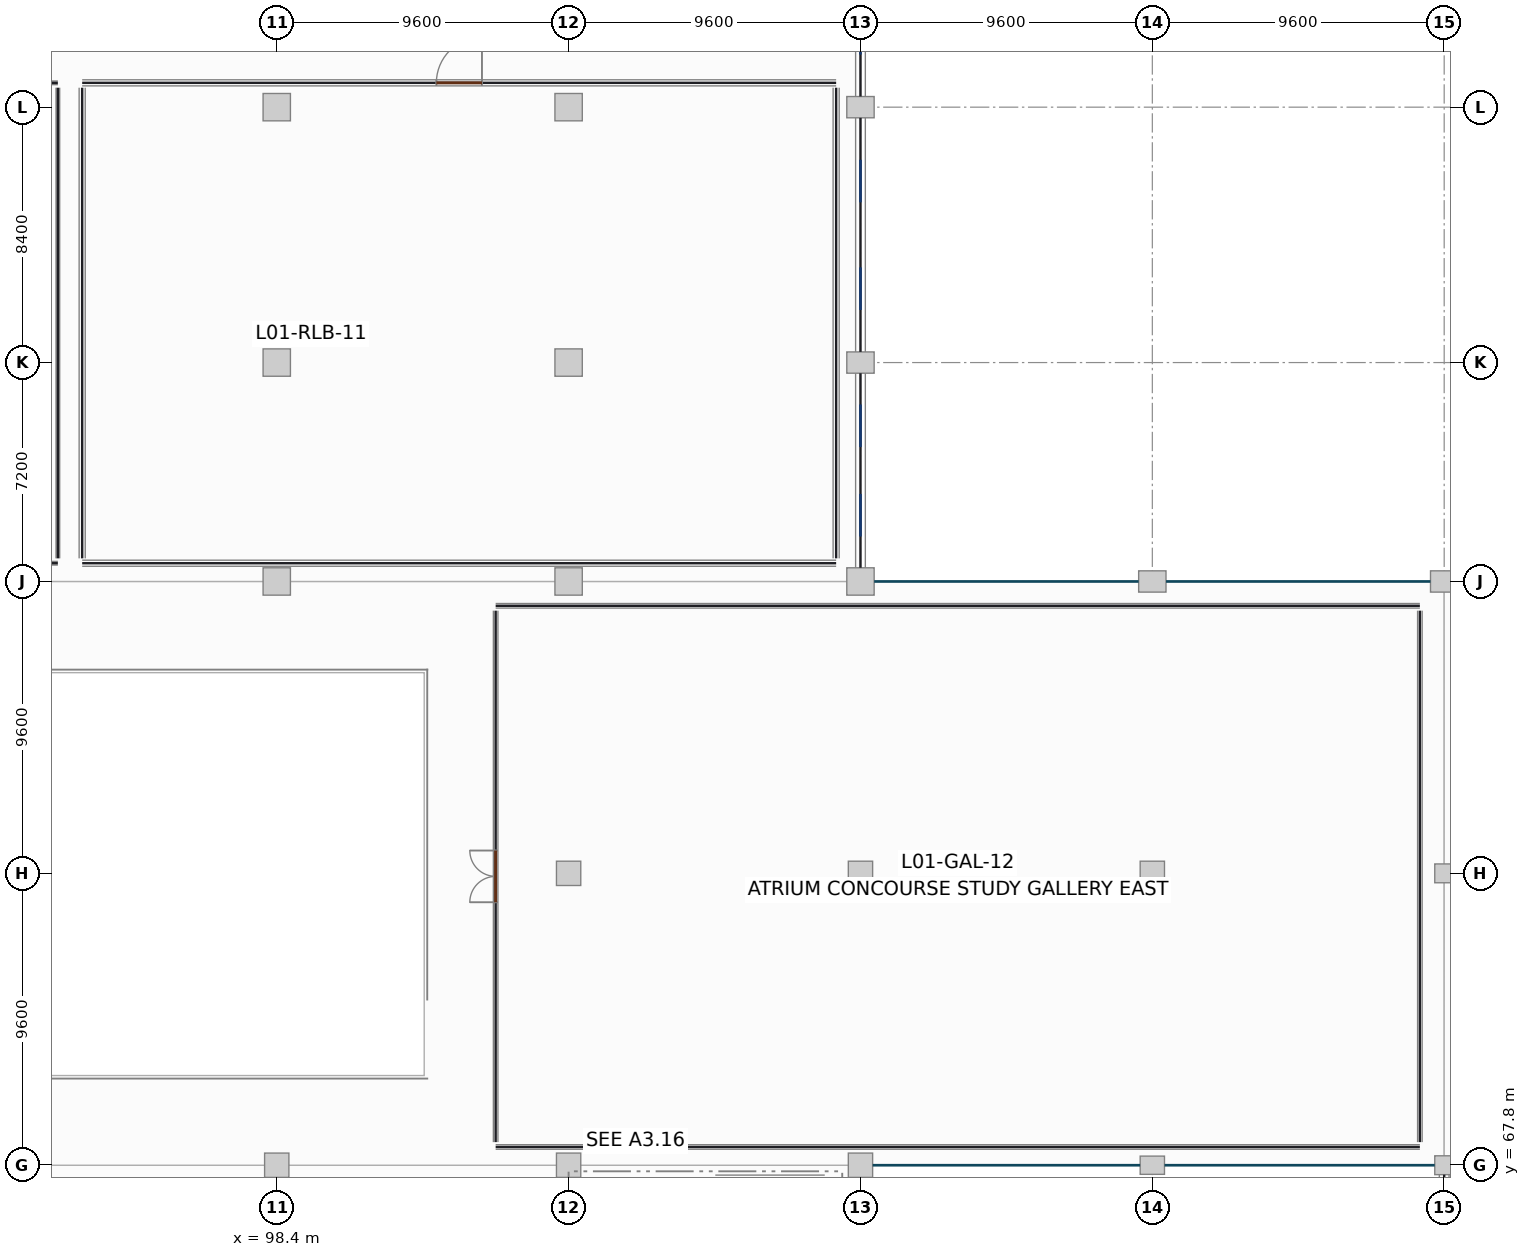
"""IFC4 building model, lengths in metres.
Left out: names, types, materials, properties, quantities, classifications, styles, units other than length and angle.
Written with IfcOpenShell. Run it as: python <this file> out.ifc"""

import sys

from ifc_helpers import new_model, si_unit, direction, frame, frame_2d, origin, origin_2d, place, context, subcontext, project, spatial, rectangle, extrude, element, fill, save


model = new_model("IFC4")
c1 = context("Model", 3, precision=1e-05, world=origin(), true_north=direction((0.0, 1.0)))
c2 = subcontext(c1, "Body", "Model", "MODEL_VIEW")
j1 = project(units=[si_unit("LENGTHUNIT", "METRE"), si_unit("PLANEANGLEUNIT", "RADIAN")], contexts=[c1])
p1 = place(None, origin())
s1 = spatial("IfcSite", under=j1, at=p1, CompositionType="ELEMENT")
p2 = place(p1, origin())
s2 = spatial("IfcBuilding", under=s1, at=p2, CompositionType="ELEMENT")
p3 = place(p2, frame((0.0, 0.0, 5.4)))
s3 = spatial("IfcBuildingStorey", under=s2, at=p3, CompositionType="ELEMENT", Elevation=5.4)
p4 = place(p3, frame((98.4, 67.8, 0.0), z_axis=(0.0, 0.0, 1.0), x_axis=(1.0, 0.0, 0.0)))
e1 = element("IfcColumn", 1, at=p4, inside=s3, PredefinedType="COLUMN", context=c2, shape_type="SweptSolid", body=[
    extrude(rectangle(XDim=0.8, YDim=0.8, at=origin_2d()), origin(), (0.0, 0.0, 1.0), 4.18),
])
for number, where, z_axis, x_axis in (
    (2, (98.4, 87.0, 0.0), (0.0, 0.0, 1.0), (1.0, 0.0, 0.0)),
    (3, (98.4, 94.2, 0.0), (0.0, 0.0, 1.0), (1.0, 0.0, 0.0)),
    (4, (98.4, 102.6, 0.0), (0.0, 0.0, 1.0), (1.0, 0.0, 0.0)),
):
    element("IfcColumn", number, at=place(p3, frame(where, z_axis=z_axis, x_axis=x_axis)), inside=s3, PredefinedType="COLUMN", context=c2, shape_type="SweptSolid", body=[
        extrude(rectangle(XDim=0.9, YDim=0.9, at=origin_2d()), origin(), (0.0, 0.0, 1.0), 4.18),
    ])
for number, where, z_axis, x_axis in (
    (5, (108.0, 67.8, 0.0), (0.0, 0.0, 1.0), (1.0, 0.0, 0.0)),
    (6, (108.0, 77.4, 0.0), (0.0, 0.0, 1.0), (1.0, 0.0, 0.0)),
):
    element("IfcColumn", number, at=place(p3, frame(where, z_axis=z_axis, x_axis=x_axis)), inside=s3, PredefinedType="COLUMN", context=c2, shape_type="SweptSolid", body=[
        extrude(rectangle(XDim=0.8, YDim=0.8, at=origin_2d()), origin(), (0.0, 0.0, 1.0), 4.18),
    ])
for number, where, z_axis, x_axis in (
    (7, (108.0, 87.0, 0.0), (0.0, 0.0, 1.0), (1.0, 0.0, 0.0)),
    (8, (108.0, 94.2, 0.0), (0.0, 0.0, 1.0), (1.0, 0.0, 0.0)),
    (9, (108.0, 102.6, 0.0), (0.0, 0.0, 1.0), (1.0, 0.0, 0.0)),
):
    element("IfcColumn", number, at=place(p3, frame(where, z_axis=z_axis, x_axis=x_axis)), inside=s3, PredefinedType="COLUMN", context=c2, shape_type="SweptSolid", body=[
        extrude(rectangle(XDim=0.9, YDim=0.9, at=origin_2d()), origin(), (0.0, 0.0, 1.0), 4.18),
    ])
for number, where, z_axis, x_axis in (
    (10, (117.6, 67.8, 0.0), (0.0, 0.0, 1.0), (1.0, 0.0, 0.0)),
    (11, (117.6, 77.4, 0.0), (0.0, 0.0, 1.0), (1.0, 0.0, 0.0)),
):
    element("IfcColumn", number, at=place(p3, frame(where, z_axis=z_axis, x_axis=x_axis)), inside=s3, PredefinedType="COLUMN", context=c2, shape_type="SweptSolid", body=[
        extrude(rectangle(XDim=0.8, YDim=0.8, at=origin_2d()), origin(), (0.0, 0.0, 1.0), 4.18),
    ])
p5 = place(p3, frame((117.6, 87.0, 0.0), z_axis=(0.0, 0.0, 1.0), x_axis=(1.0, 0.0, 0.0)))
e12 = element("IfcColumn", 12, at=p5, inside=s3, PredefinedType="COLUMN", context=c2, shape_type="SweptSolid", body=[
    extrude(rectangle(XDim=0.9, YDim=0.9, at=origin_2d()), origin(), (0.0, 0.0, 1.0), 4.18),
])
for number, where, z_axis, x_axis in (
    (13, (117.6, 94.2, 0.0), (0.0, 0.0, 1.0), (1.0, 0.0, 0.0)),
    (14, (117.6, 102.6, 0.0), (0.0, 0.0, 1.0), (1.0, 0.0, 0.0)),
):
    element("IfcColumn", number, at=place(p3, frame(where, z_axis=z_axis, x_axis=x_axis)), inside=s3, PredefinedType="COLUMN", context=c2, shape_type="SweptSolid", body=[
        extrude(rectangle(XDim=0.9, YDim=0.7, at=origin_2d()), origin(), (0.0, 0.0, 1.0), 4.18),
    ])
p6 = place(p3, frame((127.2, 67.8, 0.0), z_axis=(0.0, 0.0, 1.0), x_axis=(1.0, 0.0, 0.0)))
e15 = element("IfcColumn", 15, at=p6, inside=s3, PredefinedType="COLUMN", context=c2, shape_type="SweptSolid", body=[
    extrude(rectangle(XDim=0.8, YDim=0.6, at=origin_2d()), origin(), (0.0, 0.0, 1.0), 4.18),
])
p7 = place(p3, frame((127.2, 77.4, 0.0), z_axis=(0.0, 0.0, 1.0), x_axis=(1.0, 0.0, 0.0)))
e16 = element("IfcColumn", 16, at=p7, inside=s3, PredefinedType="COLUMN", context=c2, shape_type="SweptSolid", body=[
    extrude(rectangle(XDim=0.8, YDim=0.8, at=origin_2d()), origin(), (0.0, 0.0, 1.0), 4.18),
])
p8 = place(p3, frame((127.2, 87.0, 0.0), z_axis=(0.0, 0.0, 1.0), x_axis=(1.0, 0.0, 0.0)))
e17 = element("IfcColumn", 17, at=p8, inside=s3, PredefinedType="COLUMN", context=c2, shape_type="SweptSolid", body=[
    extrude(rectangle(XDim=0.9, YDim=0.7, at=origin_2d()), origin(), (0.0, 0.0, 1.0), 4.18),
])
for number, where, z_axis, x_axis in (
    (18, (136.8, 67.8, 0.0), (0.0, 0.0, 1.0), (1.0, 0.0, 0.0)),
    (19, (136.8, 77.4, 0.0), (0.0, 0.0, 1.0), (1.0, 0.0, 0.0)),
):
    element("IfcColumn", number, at=place(p3, frame(where, z_axis=z_axis, x_axis=x_axis)), inside=s3, PredefinedType="COLUMN", context=c2, shape_type="SweptSolid", body=[
        extrude(rectangle(XDim=0.62, YDim=0.62, at=origin_2d()), origin(), (0.0, 0.0, 1.0), 4.18),
    ])
p9 = place(p3, frame((136.8, 87.0, 0.0), z_axis=(0.0, 0.0, 1.0), x_axis=(1.0, 0.0, 0.0)))
e20 = element("IfcColumn", 20, at=p9, inside=s3, PredefinedType="COLUMN", context=c2, shape_type="SweptSolid", body=[
    extrude(rectangle(XDim=0.9, YDim=0.7, at=origin_2d()), origin(), (0.0, 0.0, 1.0), 4.18),
])
p10 = place(p3, frame((117.6, 87.452, 0.0), z_axis=(0.0, 0.0, 1.0), x_axis=(0.0, 1.0, 0.0)))
e21 = element("IfcWall", 21, at=p10, inside=s3, PredefinedType="SOLIDWALL", context=c2, shape_type="SweptSolid", body=[
    extrude(rectangle(XDim=6.396, YDim=0.32, at=frame_2d((3.198, 0.0))), origin(), (0.0, 0.0, 1.0), 3.38),
])
p11 = place(p10, frame((1.027, 0.0, 0.85)))
e22 = element("IfcOpeningElement", 22, at=p11, cuts=e21, PredefinedType="OPENING", context=c2, shape_type="SweptSolid", body=[
    extrude(rectangle(XDim=1.4, YDim=1.65, at=frame_2d((0.7, 0.825))), frame((0.0, 0.17, 0.0), z_axis=(0.0, -1.0, 0.0), x_axis=(1.0, 0.0, 0.0)), (0.0, 0.0, 1.0), 0.34),
])
p12 = place(p10, frame((3.969, 0.0, 0.85)))
e23 = element("IfcOpeningElement", 23, at=p12, cuts=e21, PredefinedType="OPENING", context=c2, shape_type="SweptSolid", body=[
    extrude(rectangle(XDim=1.4, YDim=1.65, at=frame_2d((0.7, 0.825))), frame((0.0, 0.17, 0.0), z_axis=(0.0, -1.0, 0.0), x_axis=(1.0, 0.0, 0.0)), (0.0, 0.0, 1.0), 0.34),
])
p13 = place(p3, frame((117.6, 94.552, 0.0), z_axis=(0.0, 0.0, 1.0), x_axis=(0.0, 1.0, 0.0)))
e24 = element("IfcWall", 24, at=p13, inside=s3, PredefinedType="SOLIDWALL", context=c2, shape_type="SweptSolid", body=[
    extrude(rectangle(XDim=7.696, YDim=0.32, at=frame_2d((3.848, 0.0))), origin(), (0.0, 0.0, 1.0), 3.38),
])
p14 = place(p13, frame((1.378, 0.0, 0.85)))
e25 = element("IfcOpeningElement", 25, at=p14, cuts=e24, PredefinedType="OPENING", context=c2, shape_type="SweptSolid", body=[
    extrude(rectangle(XDim=1.4, YDim=1.65, at=frame_2d((0.7, 0.825))), frame((0.0, 0.17, 0.0), z_axis=(0.0, -1.0, 0.0), x_axis=(1.0, 0.0, 0.0)), (0.0, 0.0, 1.0), 0.34),
])
p15 = place(p13, frame((4.918, 0.0, 0.85)))
e26 = element("IfcOpeningElement", 26, at=p15, cuts=e24, PredefinedType="OPENING", context=c2, shape_type="SweptSolid", body=[
    extrude(rectangle(XDim=1.4, YDim=1.65, at=frame_2d((0.7, 0.825))), frame((0.0, 0.17, 0.0), z_axis=(0.0, -1.0, 0.0), x_axis=(1.0, 0.0, 0.0)), (0.0, 0.0, 1.0), 0.34),
])
p16 = place(p3, frame((117.6, 102.952, 0.0), z_axis=(0.0, 0.0, 1.0), x_axis=(0.0, 1.0, 0.0)))
e27 = element("IfcWall", 27, at=p16, inside=s3, PredefinedType="SOLIDWALL", context=c2, shape_type="SweptSolid", body=[
    extrude(rectangle(XDim=7.696, YDim=0.32, at=frame_2d((3.848, 0.0))), origin(), (0.0, 0.0, 1.0), 3.38),
])
p17 = place(p16, frame((1.378, 0.0, 0.85)))
e28 = element("IfcOpeningElement", 28, at=p17, cuts=e27, PredefinedType="OPENING", context=c2, shape_type="SweptSolid", body=[
    extrude(rectangle(XDim=1.4, YDim=1.65, at=frame_2d((0.7, 0.825))), frame((0.0, 0.17, 0.0), z_axis=(0.0, -1.0, 0.0), x_axis=(1.0, 0.0, 0.0)), (0.0, 0.0, 1.0), 0.34),
])
p18 = place(p16, frame((4.918, 0.0, 0.85)))
e29 = element("IfcOpeningElement", 29, at=p18, cuts=e27, PredefinedType="OPENING", context=c2, shape_type="SweptSolid", body=[
    extrude(rectangle(XDim=1.4, YDim=1.65, at=frame_2d((0.7, 0.825))), frame((0.0, 0.17, 0.0), z_axis=(0.0, -1.0, 0.0), x_axis=(1.0, 0.0, 0.0)), (0.0, 0.0, 1.0), 0.34),
])
p19 = place(p3, frame((136.8, 58.432, 0.0), z_axis=(0.0, 0.0, 1.0), x_axis=(0.0, 1.0, 0.0)))
e30 = element("IfcWall", 30, at=p19, inside=s3, PredefinedType="SOLIDWALL", context=c2, shape_type="SweptSolid", body=[
    extrude(rectangle(XDim=9.056, YDim=0.32, at=frame_2d((4.528, 0.0))), origin(), (0.0, 0.0, 1.0), 3.38),
])
p20 = place(p19, frame((1.745, 0.0, 0.85)))
e31 = element("IfcOpeningElement", 31, at=p20, cuts=e30, PredefinedType="OPENING", context=c2, shape_type="SweptSolid", body=[
    extrude(rectangle(XDim=1.4, YDim=1.65, at=frame_2d((0.7, 0.825))), frame((0.0, 0.17, 0.0), z_axis=(0.0, -1.0, 0.0), x_axis=(1.0, 0.0, 0.0)), (0.0, 0.0, 1.0), 0.34),
])
p21 = place(p19, frame((5.911, 0.0, 0.85)))
e32 = element("IfcOpeningElement", 32, at=p21, cuts=e30, PredefinedType="OPENING", context=c2, shape_type="SweptSolid", body=[
    extrude(rectangle(XDim=1.4, YDim=1.65, at=frame_2d((0.7, 0.825))), frame((0.0, 0.17, 0.0), z_axis=(0.0, -1.0, 0.0), x_axis=(1.0, 0.0, 0.0)), (0.0, 0.0, 1.0), 0.34),
])
p22 = place(p3, frame((112.825, 67.3, 0.0), z_axis=(0.0, 0.0, 1.0), x_axis=(1.0, 0.0, 0.0)))
e33 = element("IfcWall", 33, at=p22, inside=s3, PredefinedType="SHEAR", context=c2, shape_type="SweptSolid", body=[
    extrude(rectangle(XDim=3.6, YDim=0.35, at=frame_2d((1.8, 0.0))), origin(), (0.0, 0.0, 1.0), 4.18),
])
for number, where, z_axis, x_axis in (
    (34, (105.6, 68.4, 0.0), (0.0, 0.0, 1.0), (1.0, 0.0, 0.0)),
    (35, (105.6, 86.2, 0.0), (0.0, 0.0, 1.0), (1.0, 0.0, 0.0)),
):
    element("IfcWall", number, at=place(p3, frame(where, z_axis=z_axis, x_axis=x_axis)), inside=s3, PredefinedType="PARTITIONING", context=c2, shape_type="SweptSolid", body=[
        extrude(rectangle(XDim=30.4, YDim=0.15, at=frame_2d((15.2, 0.0))), origin(), (0.0, 0.0, 1.0), 3.22),
    ])
p23 = place(p3, frame((105.6, 68.56, 0.0), z_axis=(0.0, 0.0, 1.0), x_axis=(0.0, 1.0, 0.0)))
e36 = element("IfcWall", 36, at=p23, inside=s3, PredefinedType="PARTITIONING", context=c2, shape_type="SweptSolid", body=[
    extrude(rectangle(XDim=17.48, YDim=0.15, at=frame_2d((8.74, 0.0))), origin(), (0.0, 0.0, 1.0), 3.22),
])
p24 = place(p23, frame((7.89, 0.0, 0.0)))
e37 = element("IfcOpeningElement", 37, at=p24, cuts=e36, PredefinedType="OPENING", context=c2, shape_type="SweptSolid", body=[
    extrude(rectangle(XDim=1.7, YDim=2.3, at=frame_2d((0.85, 1.15))), frame((0.0, 0.085, 0.0), z_axis=(0.0, -1.0, 0.0), x_axis=(1.0, 0.0, 0.0)), (0.0, 0.0, 1.0), 0.17),
])
p25 = place(p3, frame((136.0, 68.56, 0.0), z_axis=(0.0, 0.0, 1.0), x_axis=(0.0, 1.0, 0.0)))
e38 = element("IfcWall", 38, at=p25, inside=s3, PredefinedType="PARTITIONING", context=c2, shape_type="SweptSolid", body=[
    extrude(rectangle(XDim=17.48, YDim=0.15, at=frame_2d((8.74, 0.0))), origin(), (0.0, 0.0, 1.0), 3.22),
])
p26 = place(p3, frame((66.6, 87.6, 0.0), z_axis=(0.0, 0.0, 1.0), x_axis=(1.0, 0.0, 0.0)))
e39 = element("IfcWall", 39, at=p26, inside=s3, PredefinedType="PARTITIONING", context=c2, shape_type="SweptSolid", body=[
    extrude(rectangle(XDim=24.6, YDim=0.12, at=frame_2d((12.3, 0.0))), origin(), (0.0, 0.0, 1.0), 3.22),
])
p27 = place(p3, frame((66.6, 103.4, 0.0), z_axis=(0.0, 0.0, 1.0), x_axis=(1.0, 0.0, 0.0)))
e40 = element("IfcWall", 40, at=p27, inside=s3, PredefinedType="PARTITIONING", context=c2, shape_type="SweptSolid", body=[
    extrude(rectangle(XDim=24.6, YDim=0.12, at=frame_2d((12.3, 0.0))), origin(), (0.0, 0.0, 1.0), 3.22),
])
p28 = place(p27, frame((8.135, 0.0, 0.0)))
e41 = element("IfcOpeningElement", 41, at=p28, cuts=e40, PredefinedType="OPENING", context=c2, shape_type="SweptSolid", body=[
    extrude(rectangle(XDim=0.95, YDim=2.15, at=frame_2d((0.475, 1.075))), frame((0.0, 0.07, 0.0), z_axis=(0.0, -1.0, 0.0), x_axis=(1.0, 0.0, 0.0)), (0.0, 0.0, 1.0), 0.14),
])
p29 = place(p3, frame((91.2, 87.76, 0.0), z_axis=(0.0, 0.0, 1.0), x_axis=(0.0, 1.0, 0.0)))
e42 = element("IfcWall", 42, at=p29, inside=s3, PredefinedType="PARTITIONING", context=c2, shape_type="SweptSolid", body=[
    extrude(rectangle(XDim=15.48, YDim=0.12, at=frame_2d((7.74, 0.0))), origin(), (0.0, 0.0, 1.0), 3.22),
])
p30 = place(p3, frame((92.0, 87.6, 0.0), z_axis=(0.0, 0.0, 1.0), x_axis=(1.0, 0.0, 0.0)))
e43 = element("IfcWall", 43, at=p30, inside=s3, PredefinedType="PARTITIONING", context=c2, shape_type="SweptSolid", body=[
    extrude(rectangle(XDim=24.8, YDim=0.2, at=frame_2d((12.4, 0.0))), origin(), (0.0, 0.0, 1.0), 3.22),
])
p31 = place(p3, frame((92.0, 103.4, 0.0), z_axis=(0.0, 0.0, 1.0), x_axis=(1.0, 0.0, 0.0)))
e44 = element("IfcWall", 44, at=p31, inside=s3, PredefinedType="PARTITIONING", context=c2, shape_type="SweptSolid", body=[
    extrude(rectangle(XDim=24.8, YDim=0.2, at=frame_2d((12.4, 0.0))), origin(), (0.0, 0.0, 1.0), 3.22),
])
p32 = place(p31, frame((11.65, 0.0, 0.0)))
e45 = element("IfcOpeningElement", 45, at=p32, cuts=e44, PredefinedType="OPENING", context=c2, shape_type="SweptSolid", body=[
    extrude(rectangle(XDim=1.5, YDim=2.2, at=frame_2d((0.75, 1.1))), frame((0.0, 0.11, 0.0), z_axis=(0.0, -1.0, 0.0), x_axis=(1.0, 0.0, 0.0)), (0.0, 0.0, 1.0), 0.22),
])
for number, where, z_axis, x_axis in (
    (46, (92.0, 87.76, 0.0), (0.0, 0.0, 1.0), (0.0, 1.0, 0.0)),
    (47, (116.8, 87.76, 0.0), (0.0, 0.0, 1.0), (0.0, 1.0, 0.0)),
):
    element("IfcWall", number, at=place(p3, frame(where, z_axis=z_axis, x_axis=x_axis)), inside=s3, PredefinedType="PARTITIONING", context=c2, shape_type="SweptSolid", body=[
        extrude(rectangle(XDim=15.48, YDim=0.2, at=frame_2d((7.74, 0.0))), origin(), (0.0, 0.0, 1.0), 3.22),
    ])
p33 = place(p11, origin())
e48 = element("IfcWindow", 48, at=p33, inside=s3, PartitioningType="SINGLE_PANEL", PredefinedType="WINDOW", context=c2, shape_type="SweptSolid", body=[
    extrude(rectangle(XDim=1.4, YDim=1.65, at=frame_2d((0.7, 0.825))), frame((0.0, 0.03, 0.0), z_axis=(0.0, -1.0, 0.0), x_axis=(1.0, 0.0, 0.0)), (0.0, 0.0, 1.0), 0.06),
])
fill(e22, e48)
p34 = place(p12, origin())
e49 = element("IfcWindow", 49, at=p34, inside=s3, PartitioningType="SINGLE_PANEL", PredefinedType="WINDOW", context=c2, shape_type="SweptSolid", body=[
    extrude(rectangle(XDim=1.4, YDim=1.65, at=frame_2d((0.7, 0.825))), frame((0.0, 0.03, 0.0), z_axis=(0.0, -1.0, 0.0), x_axis=(1.0, 0.0, 0.0)), (0.0, 0.0, 1.0), 0.06),
])
fill(e23, e49)
p35 = place(p14, origin())
e50 = element("IfcWindow", 50, at=p35, inside=s3, PartitioningType="SINGLE_PANEL", PredefinedType="WINDOW", context=c2, shape_type="SweptSolid", body=[
    extrude(rectangle(XDim=1.4, YDim=1.65, at=frame_2d((0.7, 0.825))), frame((0.0, 0.03, 0.0), z_axis=(0.0, -1.0, 0.0), x_axis=(1.0, 0.0, 0.0)), (0.0, 0.0, 1.0), 0.06),
])
fill(e25, e50)
p36 = place(p15, origin())
e51 = element("IfcWindow", 51, at=p36, inside=s3, PartitioningType="SINGLE_PANEL", PredefinedType="WINDOW", context=c2, shape_type="SweptSolid", body=[
    extrude(rectangle(XDim=1.4, YDim=1.65, at=frame_2d((0.7, 0.825))), frame((0.0, 0.03, 0.0), z_axis=(0.0, -1.0, 0.0), x_axis=(1.0, 0.0, 0.0)), (0.0, 0.0, 1.0), 0.06),
])
fill(e26, e51)
p37 = place(p17, origin())
e52 = element("IfcWindow", 52, at=p37, inside=s3, PartitioningType="SINGLE_PANEL", PredefinedType="WINDOW", context=c2, shape_type="SweptSolid", body=[
    extrude(rectangle(XDim=1.4, YDim=1.65, at=frame_2d((0.7, 0.825))), frame((0.0, 0.03, 0.0), z_axis=(0.0, -1.0, 0.0), x_axis=(1.0, 0.0, 0.0)), (0.0, 0.0, 1.0), 0.06),
])
fill(e28, e52)
p38 = place(p24, origin())
e53 = element("IfcDoor", 53, at=p38, inside=s3, OperationType="DOUBLE_DOOR_SINGLE_SWING", PredefinedType="DOOR", context=c2, shape_type="SweptSolid", body=[
    extrude(rectangle(XDim=1.7, YDim=2.3, at=frame_2d((0.85, 1.15))), frame((0.0, 0.025, 0.0), z_axis=(0.0, -1.0, 0.0), x_axis=(1.0, 0.0, 0.0)), (0.0, 0.0, 1.0), 0.05),
])
fill(e37, e53)
p39 = place(p32, origin())
e54 = element("IfcDoor", 54, at=p39, inside=s3, OperationType="SINGLE_SWING_RIGHT", PredefinedType="DOOR", context=c2, shape_type="SweptSolid", body=[
    extrude(rectangle(XDim=1.5, YDim=2.2, at=frame_2d((0.75, 1.1))), frame((0.0, 0.025, 0.0), z_axis=(0.0, -1.0, 0.0), x_axis=(1.0, 0.0, 0.0)), (0.0, 0.0, 1.0), 0.05),
])
fill(e45, e54)
save(model, sys.argv[1])
